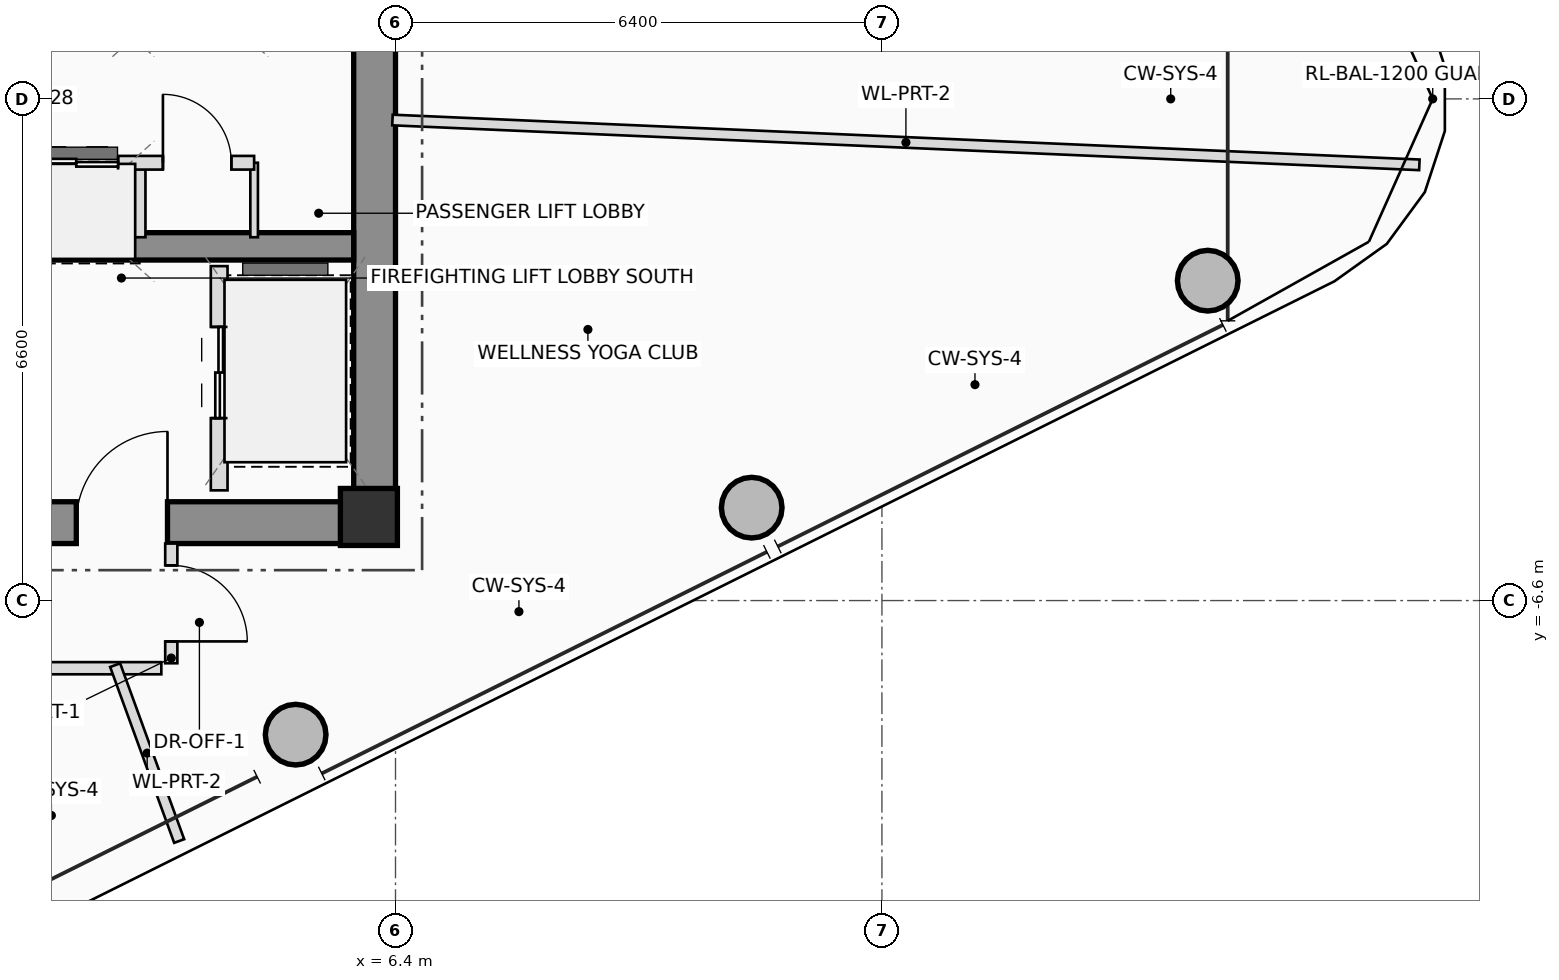
"""IFC4 building model, lengths in metres.
Left out: names, types, materials, properties, quantities, classifications, styles, units other than length and angle.
Written with IfcOpenShell. Run it as: python <this file> out.ifc"""

import sys

from ifc_helpers import new_model, si_unit, direction, frame, frame_2d, origin, origin_2d, place, context, subcontext, project, spatial, rectangle, hollow_circle, extrude, source, transform, mapped, element, fill, save


model = new_model("IFC4")
c1 = context("Model", 3, precision=1e-05, world=origin(), true_north=direction((0.0, 1.0)))
c2 = subcontext(c1, "Body", "Model", "MODEL_VIEW")
j1 = project(units=[si_unit("LENGTHUNIT", "METRE"), si_unit("PLANEANGLEUNIT", "RADIAN")], contexts=[c1])
p1 = place(None, origin())
s1 = spatial("IfcSite", under=j1, at=p1, CompositionType="ELEMENT")
p2 = place(p1, origin())
s2 = spatial("IfcBuilding", under=s1, at=p2, CompositionType="ELEMENT")
p3 = place(p2, frame((0.0, 0.0, 314.0)))
s3 = spatial("IfcBuildingStorey", under=s2, at=p3, CompositionType="ELEMENT", Elevation=314.0)
m1 = source(origin(), c2, "Body", "SweptSolid", [
    extrude(rectangle(XDim=0.75, YDim=0.75, at=origin_2d()), origin(), (0.0, 0.0, 1.0), 3.45),
])
p4 = place(p3, frame((6.05, -5.5, 0.0), z_axis=(0.0, 0.0, 1.0), x_axis=(1.0, 0.0, 0.0)))
e1 = element("IfcColumn", 1, at=p4, inside=s3, PredefinedType="COLUMN", context=c2, shape_type="MappedRepresentation", body=[
    mapped(m1, transform((0.0, 0.0, 0.0), scale=1.0)),
])
p5 = place(p3, frame((-6.4, -5.575, 0.0), z_axis=(0.0, 0.0, 1.0), x_axis=(1.0, 0.0, 0.0)))
e2 = element("IfcWall", 2, at=p5, inside=s3, PredefinedType="SHEAR", context=c2, shape_type="SweptSolid", body=[
    extrude(rectangle(XDim=12.8, YDim=0.55, at=frame_2d((6.4, 0.0))), origin(), (0.0, 0.0, 1.0), 3.45),
])
p6 = place(p5, frame((8.6, 0.0, 0.0)))
e3 = element("IfcOpeningElement", 3, at=p6, cuts=e2, PredefinedType="OPENING", context=c2, shape_type="SweptSolid", body=[
    extrude(rectangle(XDim=1.2, YDim=2.2, at=frame_2d((0.6, 1.1))), frame((0.0, 0.285, 0.0), z_axis=(0.0, -1.0, 0.0), x_axis=(1.0, 0.0, 0.0)), (0.0, 0.0, 1.0), 0.57),
])
p7 = place(p3, frame((6.125, -5.3, 0.0), z_axis=(0.0, 0.0, 1.0), x_axis=(0.0, 1.0, 0.0)))
e4 = element("IfcWall", 4, at=p7, inside=s3, PredefinedType="SHEAR", context=c2, shape_type="SweptSolid", body=[
    extrude(rectangle(XDim=10.6, YDim=0.55, at=frame_2d((5.3, 0.0))), origin(), (0.0, 0.0, 1.0), 3.45),
])
p8 = place(p3, frame((-5.85, -1.94, 0.0), z_axis=(0.0, 0.0, 1.0), x_axis=(1.0, 0.0, 0.0)))
e5 = element("IfcWall", 5, at=p8, inside=s3, PredefinedType="SHEAR", context=c2, shape_type="SweptSolid", body=[
    extrude(rectangle(XDim=11.7, YDim=0.36, at=frame_2d((5.85, 0.0))), origin(), (0.0, 0.0, 1.0), 3.45),
])
m2 = source(origin(), c2, "Body", "SweptSolid", [
    extrude(hollow_circle(Radius=0.4, WallThickness=0.028, at=origin_2d()), origin(), (0.0, 0.0, 1.0), 3.19),
])
for number, where, z_axis, x_axis in (
    (6, (5.086, -8.364, 0.0), (0.0, 0.0, 1.0), (1.0, 0.0, 0.0)),
    (7, (11.086, -5.378, 0.0), (0.0, 0.0, 1.0), (1.0, 0.0, 0.0)),
    (8, (17.087, -2.392, 0.0), (0.0, 0.0, 1.0), (1.0, 0.0, 0.0)),
):
    element("IfcColumn", number, at=place(p3, frame(where, z_axis=z_axis, x_axis=x_axis)), inside=s3, PredefinedType="COLUMN", context=c2, shape_type="MappedRepresentation", body=[
        mapped(m2, transform((0.0, 0.0, 0.0), scale=1.0)),
    ])
p9 = place(p3, frame((4.08, -5.15, 0.0), z_axis=(0.0, 0.0, 1.0), x_axis=(0.0, 1.0, 0.0)))
e9 = element("IfcWall", 9, at=p9, inside=s3, PredefinedType="PLUMBINGWALL", context=c2, shape_type="SweptSolid", body=[
    extrude(rectangle(XDim=2.95, YDim=0.22, at=frame_2d((1.475, 0.0))), origin(), (0.0, 0.0, 1.0), 3.17),
])
p10 = place(p9, frame((0.95, 0.0, 0.0)))
e10 = element("IfcOpeningElement", 10, at=p10, cuts=e9, PredefinedType="OPENING", context=c2, shape_type="SweptSolid", body=[
    extrude(rectangle(XDim=1.2, YDim=2.25, at=frame_2d((0.6, 1.125))), frame((0.0, 0.12, 0.0), z_axis=(0.0, -1.0, 0.0), x_axis=(1.0, 0.0, 0.0)), (0.0, 0.0, 1.0), 0.24),
])
p11 = place(p3, frame((3.02, -1.82, 0.0), z_axis=(0.0, 0.0, 1.0), x_axis=(0.0, 1.0, 0.0)))
e11 = element("IfcWall", 11, at=p11, inside=s3, PredefinedType="PLUMBINGWALL", context=c2, shape_type="SweptSolid", body=[
    extrude(rectangle(XDim=0.98, YDim=0.18, at=frame_2d((0.49, 0.0))), origin(), (0.0, 0.0, 1.0), 3.17),
])
p12 = place(p3, frame((4.54, -1.82, 0.0), z_axis=(0.0, 0.0, 1.0), x_axis=(0.0, 1.0, 0.0)))
e12 = element("IfcWall", 12, at=p12, inside=s3, PredefinedType="PARTITIONING", context=c2, shape_type="SweptSolid", body=[
    extrude(rectangle(XDim=0.98, YDim=0.1, at=frame_2d((0.49, 0.0))), origin(), (0.0, 0.0, 1.0), 3.17),
])
p13 = place(p3, frame((-5.68, -0.84, 0.0), z_axis=(0.0, 0.0, 1.0), x_axis=(1.0, 0.0, 0.0)))
e13 = element("IfcWall", 13, at=p13, inside=s3, PredefinedType="PLUMBINGWALL", context=c2, shape_type="SweptSolid", body=[
    extrude(rectangle(XDim=10.22, YDim=0.18, at=frame_2d((5.11, 0.0))), origin(), (0.0, 0.0, 1.0), 3.17),
])
p14 = place(p13, frame((1.88, 0.0, 0.0)))
e14 = element("IfcOpeningElement", 14, at=p14, cuts=e13, PredefinedType="OPENING", context=c2, shape_type="SweptSolid", body=[
    extrude(rectangle(XDim=0.9, YDim=2.05, at=frame_2d((0.45, 1.025))), frame((0.0, 0.1, 0.0), z_axis=(0.0, -1.0, 0.0), x_axis=(1.0, 0.0, 0.0)), (0.0, 0.0, 1.0), 0.2),
])
p15 = place(p13, frame((5.35, 0.0, 0.0)))
e15 = element("IfcOpeningElement", 15, at=p15, cuts=e13, PredefinedType="OPENING", context=c2, shape_type="SweptSolid", body=[
    extrude(rectangle(XDim=0.9, YDim=2.05, at=frame_2d((0.45, 1.025))), frame((0.0, 0.1, 0.0), z_axis=(0.0, -1.0, 0.0), x_axis=(1.0, 0.0, 0.0)), (0.0, 0.0, 1.0), 0.2),
])
p16 = place(p13, frame((7.33, 0.0, 0.0)))
e16 = element("IfcOpeningElement", 16, at=p16, cuts=e13, PredefinedType="OPENING", context=c2, shape_type="SweptSolid", body=[
    extrude(rectangle(XDim=1.1, YDim=2.2, at=frame_2d((0.55, 1.1))), frame((0.0, 0.1, 0.0), z_axis=(0.0, -1.0, 0.0), x_axis=(1.0, 0.0, 0.0)), (0.0, 0.0, 1.0), 0.2),
])
p17 = place(p13, frame((9.02, 0.0, 0.0)))
e17 = element("IfcOpeningElement", 17, at=p17, cuts=e13, PredefinedType="OPENING", context=c2, shape_type="SweptSolid", body=[
    extrude(rectangle(XDim=0.9, YDim=2.05, at=frame_2d((0.45, 1.025))), frame((0.0, 0.1, 0.0), z_axis=(0.0, -1.0, 0.0), x_axis=(1.0, 0.0, 0.0)), (0.0, 0.0, 1.0), 0.2),
])
p18 = place(p3, frame((3.45, -5.85, 0.0), z_axis=(0.0, 0.0, 1.0), x_axis=(0.0, -1.0, 0.0)))
e18 = element("IfcWall", 18, at=p18, inside=s3, PredefinedType="PARTITIONING", context=c2, shape_type="SweptSolid", body=[
    extrude(rectangle(XDim=1.575, YDim=0.16, at=frame_2d((0.787, 0.0))), origin(), (0.0, 0.0, 1.0), 2.775),
])
p19 = place(p18, frame((0.287, 0.0, 0.0)))
e19 = element("IfcOpeningElement", 19, at=p19, cuts=e18, PredefinedType="OPENING", context=c2, shape_type="SweptSolid", body=[
    extrude(rectangle(XDim=1.0, YDim=2.25, at=frame_2d((0.5, 1.125))), frame((0.0, 0.09, 0.0), z_axis=(0.0, -1.0, 0.0), x_axis=(1.0, 0.0, 0.0)), (0.0, 0.0, 1.0), 0.18),
])
p20 = place(p3, frame((3.319, -7.49, 0.0), z_axis=(0.0, 0.0, 1.0), x_axis=(-1.0, 0.0, 0.0)))
e20 = element("IfcWall", 20, at=p20, inside=s3, PredefinedType="PARTITIONING", context=c2, shape_type="SweptSolid", body=[
    extrude(rectangle(XDim=9.679, YDim=0.16, at=frame_2d((4.84, 0.0))), origin(), (0.0, 0.0, 1.0), 2.575),
])
p21 = place(p20, frame((4.53, 0.0, 0.0)))
e21 = element("IfcOpeningElement", 21, at=p21, cuts=e20, PredefinedType="OPENING", context=c2, shape_type="SweptSolid", body=[
    extrude(rectangle(XDim=1.0, YDim=2.25, at=frame_2d((0.5, 1.125))), frame((0.0, 0.09, 0.0), z_axis=(0.0, -1.0, 0.0), x_axis=(1.0, 0.0, 0.0)), (0.0, 0.0, 1.0), 0.18),
])
p22 = place(p3, frame((6.36, -0.278, 0.0), z_axis=(0.0, 0.0, 1.0), x_axis=(0.999047623791, -0.043633076864, 0.0)))
e22 = element("IfcWall", 22, at=p22, inside=s3, PredefinedType="PARTITIONING", context=c2, shape_type="SweptSolid", body=[
    extrude(rectangle(XDim=13.524, YDim=0.14, at=frame_2d((6.762, 0.0))), origin(), (0.0, 0.0, 1.0), 2.735),
])
p23 = place(p3, frame((2.712, -7.45, 0.0), z_axis=(0.0, 0.0, 1.0), x_axis=(0.341989856239, -0.939703643831, 0.0)))
e23 = element("IfcWall", 23, at=p23, inside=s3, PredefinedType="PARTITIONING", context=c2, shape_type="SweptSolid", body=[
    extrude(rectangle(XDim=2.462, YDim=0.14, at=frame_2d((1.231, 0.0))), origin(), (0.0, 0.0, 1.0), 2.735),
])
p24 = place(p6, origin())
e24 = element("IfcDoor", 24, at=p24, inside=s3, OperationType="SINGLE_SWING_RIGHT", PredefinedType="DOOR", context=c2, shape_type="SweptSolid", body=[
    extrude(rectangle(XDim=1.2, YDim=2.2, at=frame_2d((0.6, 1.1))), frame((0.0, 0.025, 0.0), z_axis=(0.0, -1.0, 0.0), x_axis=(1.0, 0.0, 0.0)), (0.0, 0.0, 1.0), 0.05),
])
fill(e3, e24)
p25 = place(p10, origin())
e25 = element("IfcDoor", 25, at=p25, inside=s3, OperationType="DOUBLE_DOOR_SLIDING", PredefinedType="DOOR", context=c2, shape_type="SweptSolid", body=[
    extrude(rectangle(XDim=1.2, YDim=2.25, at=frame_2d((0.6, 1.125))), frame((0.0, 0.025, 0.0), z_axis=(0.0, -1.0, 0.0), x_axis=(1.0, 0.0, 0.0)), (0.0, 0.0, 1.0), 0.05),
])
fill(e10, e25)
p26 = place(p16, origin())
e26 = element("IfcDoor", 26, at=p26, inside=s3, OperationType="DOUBLE_DOOR_SLIDING", PredefinedType="DOOR", context=c2, shape_type="SweptSolid", body=[
    extrude(rectangle(XDim=1.1, YDim=2.2, at=frame_2d((0.55, 1.1))), frame((0.0, 0.025, 0.0), z_axis=(0.0, -1.0, 0.0), x_axis=(1.0, 0.0, 0.0)), (0.0, 0.0, 1.0), 0.05),
])
fill(e16, e26)
p27 = place(p17, origin())
e27 = element("IfcDoor", 27, at=p27, inside=s3, OperationType="SINGLE_SWING_LEFT", PredefinedType="DOOR", context=c2, shape_type="SweptSolid", body=[
    extrude(rectangle(XDim=0.9, YDim=2.05, at=frame_2d((0.45, 1.025))), frame((0.0, 0.025, 0.0), z_axis=(0.0, -1.0, 0.0), x_axis=(1.0, 0.0, 0.0)), (0.0, 0.0, 1.0), 0.05),
])
fill(e17, e27)
p28 = place(p19, origin())
e28 = element("IfcDoor", 28, at=p28, inside=s3, OperationType="SINGLE_SWING_RIGHT", PredefinedType="DOOR", context=c2, shape_type="SweptSolid", body=[
    extrude(rectangle(XDim=1.0, YDim=2.25, at=frame_2d((0.5, 1.125))), frame((0.0, 0.025, 0.0), z_axis=(0.0, -1.0, 0.0), x_axis=(1.0, 0.0, 0.0)), (0.0, 0.0, 1.0), 0.05),
])
fill(e19, e28)
save(model, sys.argv[1])
